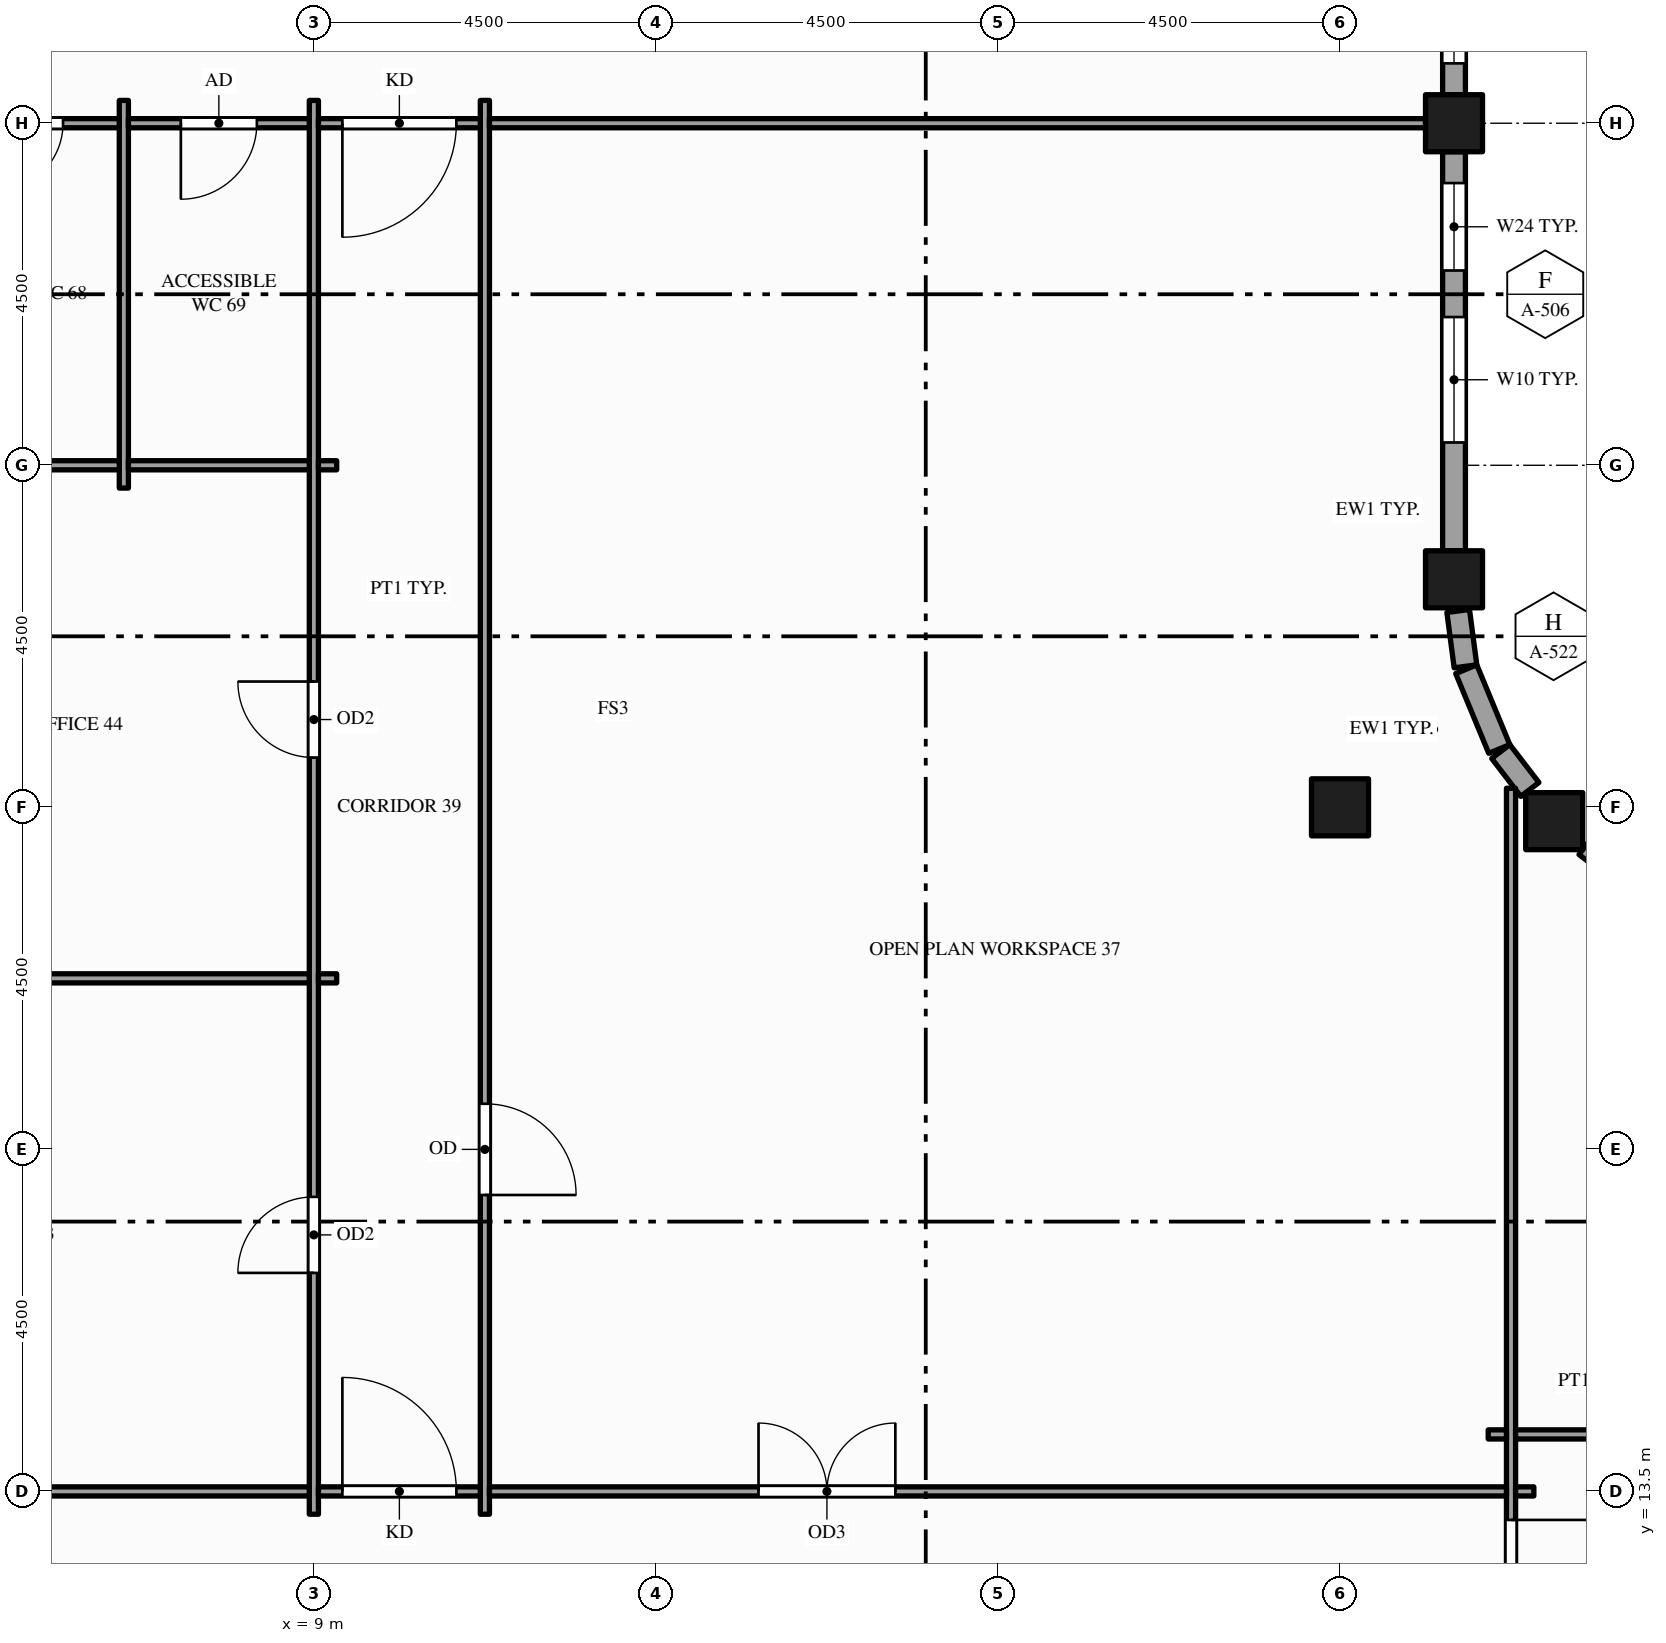
"""IFC4 building model, lengths in metres.
Left out: names, types, materials, properties, quantities, classifications, styles, units other than length and angle.
Written with IfcOpenShell. Run it as: python <this file> out.ifc"""

import sys

from ifc_helpers import new_model, si_unit, direction, frame, frame_2d, origin, origin_2d, place, context, subcontext, project, spatial, rectangle, hollow_rectangle, extrude, element, fill, save


model = new_model("IFC4")
c1 = context("Model", 3, precision=1e-05, world=origin(), true_north=direction((0.0, 1.0)))
c2 = subcontext(c1, "Body", "Model", "MODEL_VIEW")
j1 = project(units=[si_unit("LENGTHUNIT", "METRE"), si_unit("PLANEANGLEUNIT", "RADIAN")], contexts=[c1])
p1 = place(None, origin())
s1 = spatial("IfcSite", under=j1, at=p1, CompositionType="ELEMENT")
p2 = place(p1, origin())
s2 = spatial("IfcBuilding", under=s1, at=p2, CompositionType="ELEMENT")
p3 = place(p2, frame((0.0, 0.0, 235.0)))
s3 = spatial("IfcBuildingStorey", under=s2, at=p3, CompositionType="ELEMENT", Elevation=235.0)
for number, where, z_axis, x_axis in (
    (1, (22.5, 22.5, -0.15), (0.0, 0.0, 1.0), (1.0, 0.0, 0.0)),
    (2, (24.0, 25.5, -0.15), (0.0, 0.0, 1.0), (1.0, 0.0, 0.0)),
    (3, (24.0, 31.5, -0.15), (0.0, 0.0, 1.0), (1.0, 0.0, 0.0)),
    (4, (25.318, 22.318, -0.15), (0.0, 0.0, 1.0), (1.0, 0.0, 0.0)),
):
    element("IfcColumn", number, at=place(p3, frame(where, z_axis=z_axis, x_axis=x_axis)), inside=s3, PredefinedType="COLUMN", context=c2, shape_type="SweptSolid", body=[
        extrude(hollow_rectangle(XDim=0.75, YDim=0.75, WallThickness=0.036, at=origin_2d()), origin(), (0.0, 0.0, 1.0), 4.0),
    ])
p4 = place(p3, frame((26.234, 21.615, 0.0), z_axis=(0.0, 0.0, 1.0), x_axis=(-0.793575131083, 0.608472276547, 0.0)))
e5 = element("IfcWall", 5, at=p4, inside=s3, PredefinedType="STANDARD", context=c2, shape_type="SweptSolid", body=[
    extrude(rectangle(XDim=0.629, YDim=0.3, at=frame_2d((0.314, 0.0))), origin(), (0.0, 0.0, 1.0), 3.157),
])
p5 = place(p3, frame((24.998, 22.735, 0.0), z_axis=(0.0, 0.0, 1.0), x_axis=(-0.608472276547, 0.793575131083, 0.0)))
e6 = element("IfcWall", 6, at=p5, inside=s3, PredefinedType="STANDARD", context=c2, shape_type="SweptSolid", body=[
    extrude(rectangle(XDim=0.629, YDim=0.3, at=frame_2d((0.314, 0.0))), origin(), (0.0, 0.0, 1.0), 2.76),
])
p6 = place(p3, frame((24.595, 23.268, 0.0), z_axis=(0.0, 0.0, 1.0), x_axis=(-0.382598720491, 0.923914616768, 0.0)))
e7 = element("IfcWall", 7, at=p6, inside=s3, PredefinedType="STANDARD", context=c2, shape_type="SweptSolid", body=[
    extrude(rectangle(XDim=1.135, YDim=0.3, at=frame_2d((0.568, 0.0))), origin(), (0.0, 0.0, 1.0), 2.76),
])
p7 = place(p3, frame((24.151, 24.355, 0.0), z_axis=(0.0, 0.0, 1.0), x_axis=(-0.130660917588, 0.99142711513, 0.0)))
e8 = element("IfcWall", 8, at=p7, inside=s3, PredefinedType="STANDARD", context=c2, shape_type="SweptSolid", body=[
    extrude(rectangle(XDim=0.734, YDim=0.3, at=frame_2d((0.367, 0.0))), origin(), (0.0, 0.0, 1.0), 3.157),
])
p8 = place(p3, frame((24.0, 25.875, 0.0), z_axis=(0.0, 0.0, 1.0), x_axis=(0.0, 1.0, 0.0)))
e9 = element("IfcWall", 9, at=p8, inside=s3, PredefinedType="STANDARD", context=c2, shape_type="SweptSolid", body=[
    extrude(rectangle(XDim=5.25, YDim=0.3, at=frame_2d((2.625, 0.0))), origin(), (0.0, 0.0, 1.0), 3.157),
])
p9 = place(p8, frame((1.425, 0.0, 0.9)))
e10 = element("IfcOpeningElement", 10, at=p9, cuts=e9, PredefinedType="OPENING", context=c2, shape_type="SweptSolid", body=[
    extrude(rectangle(XDim=1.65, YDim=2.0, at=frame_2d((0.825, 1.0))), frame((0.0, 0.16, 0.0), z_axis=(0.0, -1.0, 0.0), x_axis=(1.0, 0.0, 0.0)), (0.0, 0.0, 1.0), 0.32),
])
p10 = place(p8, frame((3.688, 0.0, 0.9)))
e11 = element("IfcOpeningElement", 11, at=p10, cuts=e9, PredefinedType="OPENING", context=c2, shape_type="SweptSolid", body=[
    extrude(rectangle(XDim=1.15, YDim=2.0, at=frame_2d((0.575, 1.0))), frame((0.0, 0.16, 0.0), z_axis=(0.0, -1.0, 0.0), x_axis=(1.0, 0.0, 0.0)), (0.0, 0.0, 1.0), 0.32),
])
p11 = place(p3, frame((24.0, 31.875, 0.0), z_axis=(0.0, 0.0, 1.0), x_axis=(0.0, 1.0, 0.0)))
e12 = element("IfcWall", 12, at=p11, inside=s3, PredefinedType="STANDARD", context=c2, shape_type="SweptSolid", body=[
    extrude(rectangle(XDim=3.75, YDim=0.3, at=frame_2d((1.875, 0.0))), origin(), (0.0, 0.0, 1.0), 3.157),
])
p12 = place(p11, frame((0.413, 0.0, 0.9)))
e13 = element("IfcOpeningElement", 13, at=p12, cuts=e12, PredefinedType="OPENING", context=c2, shape_type="SweptSolid", body=[
    extrude(rectangle(XDim=1.15, YDim=2.0, at=frame_2d((0.575, 1.0))), frame((0.0, 0.16, 0.0), z_axis=(0.0, -1.0, 0.0), x_axis=(1.0, 0.0, 0.0)), (0.0, 0.0, 1.0), 0.32),
])
p13 = place(p11, frame((2.188, 0.0, 0.9)))
e14 = element("IfcOpeningElement", 14, at=p13, cuts=e12, PredefinedType="OPENING", context=c2, shape_type="SweptSolid", body=[
    extrude(rectangle(XDim=1.15, YDim=2.0, at=frame_2d((0.575, 1.0))), frame((0.0, 0.16, 0.0), z_axis=(0.0, -1.0, 0.0), x_axis=(1.0, 0.0, 0.0)), (0.0, 0.0, 1.0), 0.32),
])
p14 = place(p3, frame((6.5, 26.7, 0.0), z_axis=(0.0, 0.0, 1.0), x_axis=(0.0, 1.0, 0.0)))
e15 = element("IfcWall", 15, at=p14, inside=s3, PredefinedType="PARTITIONING", context=c2, shape_type="SweptSolid", body=[
    extrude(rectangle(XDim=5.1, YDim=0.12, at=frame_2d((2.55, 0.0))), origin(), (0.0, 0.0, 1.0), 3.85),
])
p15 = place(p3, frame((9.0, 13.2, 0.0), z_axis=(0.0, 0.0, 1.0), x_axis=(0.0, 1.0, 0.0)))
e16 = element("IfcWall", 16, at=p15, inside=s3, PredefinedType="PARTITIONING", context=c2, shape_type="SweptSolid", body=[
    extrude(rectangle(XDim=18.6, YDim=0.12, at=frame_2d((9.3, 0.0))), origin(), (0.0, 0.0, 1.0), 2.6),
])
p16 = place(p15, frame((3.175, 0.0, 0.0)))
e17 = element("IfcOpeningElement", 17, at=p16, cuts=e16, PredefinedType="OPENING", context=c2, shape_type="SweptSolid", body=[
    extrude(rectangle(XDim=1.0, YDim=2.1, at=frame_2d((0.5, 1.05))), frame((0.0, 0.07, 0.0), z_axis=(0.0, -1.0, 0.0), x_axis=(1.0, 0.0, 0.0)), (0.0, 0.0, 1.0), 0.14),
])
p17 = place(p15, frame((9.955, 0.0, 0.0)))
e18 = element("IfcOpeningElement", 18, at=p17, cuts=e16, PredefinedType="OPENING", context=c2, shape_type="SweptSolid", body=[
    extrude(rectangle(XDim=1.0, YDim=2.1, at=frame_2d((0.5, 1.05))), frame((0.0, 0.07, 0.0), z_axis=(0.0, -1.0, 0.0), x_axis=(1.0, 0.0, 0.0)), (0.0, 0.0, 1.0), 0.14),
])
p18 = place(p3, frame((11.25, 13.2, 0.0), z_axis=(0.0, 0.0, 1.0), x_axis=(0.0, 1.0, 0.0)))
e19 = element("IfcWall", 19, at=p18, inside=s3, PredefinedType="PARTITIONING", context=c2, shape_type="SweptSolid", body=[
    extrude(rectangle(XDim=18.6, YDim=0.12, at=frame_2d((9.3, 0.0))), origin(), (0.0, 0.0, 1.0), 2.6),
])
p19 = place(p18, frame((4.2, 0.0, 0.0)))
e20 = element("IfcOpeningElement", 20, at=p19, cuts=e19, PredefinedType="OPENING", context=c2, shape_type="SweptSolid", body=[
    extrude(rectangle(XDim=1.2, YDim=2.1, at=frame_2d((0.6, 1.05))), frame((0.0, 0.07, 0.0), z_axis=(0.0, -1.0, 0.0), x_axis=(1.0, 0.0, 0.0)), (0.0, 0.0, 1.0), 0.14),
])
p20 = place(p3, frame((24.75, -1.35, 0.0), z_axis=(0.0, 0.0, 1.0), x_axis=(0.0, 1.0, 0.0)))
e21 = element("IfcWall", 21, at=p20, inside=s3, PredefinedType="PARTITIONING", context=c2, shape_type="SweptSolid", body=[
    extrude(rectangle(XDim=24.101, YDim=0.12, at=frame_2d((12.05, 0.0))), origin(), (0.0, 0.0, 1.0), 2.76),
])
p21 = place(p20, frame((12.975, 0.0, 0.0)))
e22 = element("IfcOpeningElement", 22, at=p21, cuts=e21, PredefinedType="OPENING", context=c2, shape_type="SweptSolid", body=[
    extrude(rectangle(XDim=1.5, YDim=2.1, at=frame_2d((0.75, 1.05))), frame((0.0, 0.07, 0.0), z_axis=(0.0, -1.0, 0.0), x_axis=(1.0, 0.0, 0.0)), (0.0, 0.0, 1.0), 0.14),
])
p22 = place(p3, frame((0.15, 13.5, 0.0), z_axis=(0.0, 0.0, 1.0), x_axis=(1.0, 0.0, 0.0)))
e23 = element("IfcWall", 23, at=p22, inside=s3, PredefinedType="PARTITIONING", context=c2, shape_type="SweptSolid", body=[
    extrude(rectangle(XDim=8.79, YDim=0.12, at=frame_2d((4.395, 0.0))), origin(), (0.0, 0.0, 1.0), 2.87),
])
p23 = place(p3, frame((9.06, 13.5, 0.0), z_axis=(0.0, 0.0, 1.0), x_axis=(1.0, 0.0, 0.0)))
e24 = element("IfcWall", 24, at=p23, inside=s3, PredefinedType="PARTITIONING", context=c2, shape_type="SweptSolid", body=[
    extrude(rectangle(XDim=2.13, YDim=0.12, at=frame_2d((1.065, 0.0))), origin(), (0.0, 0.0, 1.0), 2.87),
])
p24 = place(p23, frame((0.315, 0.0, 0.0)))
e25 = element("IfcOpeningElement", 25, at=p24, cuts=e24, PredefinedType="OPENING", context=c2, shape_type="SweptSolid", body=[
    extrude(rectangle(XDim=1.5, YDim=2.1, at=frame_2d((0.75, 1.05))), frame((0.0, 0.07, 0.0), z_axis=(0.0, -1.0, 0.0), x_axis=(1.0, 0.0, 0.0)), (0.0, 0.0, 1.0), 0.14),
])
p25 = place(p3, frame((11.31, 13.5, 0.0), z_axis=(0.0, 0.0, 1.0), x_axis=(1.0, 0.0, 0.0)))
e26 = element("IfcWall", 26, at=p25, inside=s3, PredefinedType="PARTITIONING", context=c2, shape_type="SweptSolid", body=[
    extrude(rectangle(XDim=13.38, YDim=0.12, at=frame_2d((6.69, 0.0))), origin(), (0.0, 0.0, 1.0), 2.76),
])
p26 = place(p25, frame((3.54, 0.0, 0.0)))
e27 = element("IfcOpeningElement", 27, at=p26, cuts=e26, PredefinedType="OPENING", context=c2, shape_type="SweptSolid", body=[
    extrude(rectangle(XDim=1.8, YDim=2.1, at=frame_2d((0.9, 1.05))), frame((0.0, 0.07, 0.0), z_axis=(0.0, -1.0, 0.0), x_axis=(1.0, 0.0, 0.0)), (0.0, 0.0, 1.0), 0.14),
])
for number, where, z_axis, x_axis in (
    (28, (24.81, 13.5, 0.0), (0.0, 0.0, 1.0), (1.0, 0.0, 0.0)),
    (29, (24.45, 14.25, 0.0), (0.0, 0.0, 1.0), (1.0, 0.0, 0.0)),
):
    element("IfcWall", number, at=place(p3, frame(where, z_axis=z_axis, x_axis=x_axis)), inside=s3, PredefinedType="PARTITIONING", context=c2, shape_type="SweptSolid", body=[
        extrude(rectangle(XDim=0.24, YDim=0.12, at=frame_2d((0.12, 0.0))), origin(), (0.0, 0.0, 1.0), 2.76),
    ])
p27 = place(p3, frame((24.81, 14.25, 0.0), z_axis=(0.0, 0.0, 1.0), x_axis=(1.0, 0.0, 0.0)))
e30 = element("IfcWall", 30, at=p27, inside=s3, PredefinedType="PARTITIONING", context=c2, shape_type="SweptSolid", body=[
    extrude(rectangle(XDim=2.13, YDim=0.12, at=frame_2d((1.065, 0.0))), origin(), (0.0, 0.0, 1.0), 2.76),
])
p28 = place(p3, frame((0.15, 20.25, 0.0), z_axis=(0.0, 0.0, 1.0), x_axis=(1.0, 0.0, 0.0)))
e31 = element("IfcWall", 31, at=p28, inside=s3, PredefinedType="PARTITIONING", context=c2, shape_type="SweptSolid", body=[
    extrude(rectangle(XDim=8.79, YDim=0.12, at=frame_2d((4.395, 0.0))), origin(), (0.0, 0.0, 1.0), 2.87),
])
p29 = place(p3, frame((9.06, 20.25, 0.0), z_axis=(0.0, 0.0, 1.0), x_axis=(1.0, 0.0, 0.0)))
e32 = element("IfcWall", 32, at=p29, inside=s3, PredefinedType="PARTITIONING", context=c2, shape_type="SweptSolid", body=[
    extrude(rectangle(XDim=0.24, YDim=0.12, at=frame_2d((0.12, 0.0))), origin(), (0.0, 0.0, 1.0), 2.87),
])
for number, where, z_axis, x_axis in (
    (33, (4.06, 27.0, 0.0), (0.0, 0.0, 1.0), (1.0, 0.0, 0.0)),
    (34, (6.56, 27.0, 0.0), (0.0, 0.0, 1.0), (1.0, 0.0, 0.0)),
):
    element("IfcWall", number, at=place(p3, frame(where, z_axis=z_axis, x_axis=x_axis)), inside=s3, PredefinedType="PARTITIONING", context=c2, shape_type="SweptSolid", body=[
        extrude(rectangle(XDim=2.38, YDim=0.12, at=frame_2d((1.19, 0.0))), origin(), (0.0, 0.0, 1.0), 2.87),
    ])
p30 = place(p3, frame((9.06, 27.0, 0.0), z_axis=(0.0, 0.0, 1.0), x_axis=(1.0, 0.0, 0.0)))
e35 = element("IfcWall", 35, at=p30, inside=s3, PredefinedType="PARTITIONING", context=c2, shape_type="SweptSolid", body=[
    extrude(rectangle(XDim=0.24, YDim=0.12, at=frame_2d((0.12, 0.0))), origin(), (0.0, 0.0, 1.0), 2.87),
])
p31 = place(p3, frame((4.06, 31.5, 0.0), z_axis=(0.0, 0.0, 1.0), x_axis=(1.0, 0.0, 0.0)))
e36 = element("IfcWall", 36, at=p31, inside=s3, PredefinedType="PARTITIONING", context=c2, shape_type="SweptSolid", body=[
    extrude(rectangle(XDim=2.38, YDim=0.12, at=frame_2d((1.19, 0.0))), origin(), (0.0, 0.0, 1.0), 2.87),
])
p32 = place(p31, frame((0.74, 0.0, 0.0)))
e37 = element("IfcOpeningElement", 37, at=p32, cuts=e36, PredefinedType="OPENING", context=c2, shape_type="SweptSolid", body=[
    extrude(rectangle(XDim=0.9, YDim=2.1, at=frame_2d((0.45, 1.05))), frame((0.0, 0.07, 0.0), z_axis=(0.0, -1.0, 0.0), x_axis=(1.0, 0.0, 0.0)), (0.0, 0.0, 1.0), 0.14),
])
p33 = place(p3, frame((6.56, 31.5, 0.0), z_axis=(0.0, 0.0, 1.0), x_axis=(1.0, 0.0, 0.0)))
e38 = element("IfcWall", 38, at=p33, inside=s3, PredefinedType="PARTITIONING", context=c2, shape_type="SweptSolid", body=[
    extrude(rectangle(XDim=2.38, YDim=0.12, at=frame_2d((1.19, 0.0))), origin(), (0.0, 0.0, 1.0), 2.87),
])
p34 = place(p33, frame((0.69, 0.0, 0.0)))
e39 = element("IfcOpeningElement", 39, at=p34, cuts=e38, PredefinedType="OPENING", context=c2, shape_type="SweptSolid", body=[
    extrude(rectangle(XDim=1.0, YDim=2.1, at=frame_2d((0.5, 1.05))), frame((0.0, 0.07, 0.0), z_axis=(0.0, -1.0, 0.0), x_axis=(1.0, 0.0, 0.0)), (0.0, 0.0, 1.0), 0.14),
])
p35 = place(p3, frame((9.06, 31.5, 0.0), z_axis=(0.0, 0.0, 1.0), x_axis=(1.0, 0.0, 0.0)))
e40 = element("IfcWall", 40, at=p35, inside=s3, PredefinedType="PARTITIONING", context=c2, shape_type="SweptSolid", body=[
    extrude(rectangle(XDim=2.13, YDim=0.12, at=frame_2d((1.065, 0.0))), origin(), (0.0, 0.0, 1.0), 2.87),
])
p36 = place(p35, frame((0.315, 0.0, 0.0)))
e41 = element("IfcOpeningElement", 41, at=p36, cuts=e40, PredefinedType="OPENING", context=c2, shape_type="SweptSolid", body=[
    extrude(rectangle(XDim=1.5, YDim=2.1, at=frame_2d((0.75, 1.05))), frame((0.0, 0.07, 0.0), z_axis=(0.0, -1.0, 0.0), x_axis=(1.0, 0.0, 0.0)), (0.0, 0.0, 1.0), 0.14),
])
p37 = place(p3, frame((11.31, 31.5, 0.0), z_axis=(0.0, 0.0, 1.0), x_axis=(1.0, 0.0, 0.0)))
e42 = element("IfcWall", 42, at=p37, inside=s3, PredefinedType="PARTITIONING", context=c2, shape_type="SweptSolid", body=[
    extrude(rectangle(XDim=12.54, YDim=0.12, at=frame_2d((6.27, 0.0))), origin(), (0.0, 0.0, 1.0), 2.87),
])
p38 = place(p9, origin())
e43 = element("IfcWindow", 43, at=p38, inside=s3, PartitioningType="SINGLE_PANEL", PredefinedType="WINDOW", context=c2, shape_type="SweptSolid", body=[
    extrude(rectangle(XDim=1.65, YDim=2.0, at=frame_2d((0.825, 1.0))), frame((0.0, 0.03, 0.0), z_axis=(0.0, -1.0, 0.0), x_axis=(1.0, 0.0, 0.0)), (0.0, 0.0, 1.0), 0.06),
])
fill(e10, e43)
p39 = place(p10, origin())
e44 = element("IfcWindow", 44, at=p39, inside=s3, PartitioningType="SINGLE_PANEL", PredefinedType="WINDOW", context=c2, shape_type="SweptSolid", body=[
    extrude(rectangle(XDim=1.15, YDim=2.0, at=frame_2d((0.575, 1.0))), frame((0.0, 0.03, 0.0), z_axis=(0.0, -1.0, 0.0), x_axis=(1.0, 0.0, 0.0)), (0.0, 0.0, 1.0), 0.06),
])
fill(e11, e44)
p40 = place(p12, origin())
e45 = element("IfcWindow", 45, at=p40, inside=s3, PartitioningType="SINGLE_PANEL", PredefinedType="WINDOW", context=c2, shape_type="SweptSolid", body=[
    extrude(rectangle(XDim=1.15, YDim=2.0, at=frame_2d((0.575, 1.0))), frame((0.0, 0.03, 0.0), z_axis=(0.0, -1.0, 0.0), x_axis=(1.0, 0.0, 0.0)), (0.0, 0.0, 1.0), 0.06),
])
fill(e13, e45)
p41 = place(p21, origin())
e46 = element("IfcDoor", 46, at=p41, inside=s3, OperationType="SINGLE_SWING_RIGHT", PredefinedType="DOOR", context=c2, shape_type="SweptSolid", body=[
    extrude(rectangle(XDim=1.5, YDim=2.1, at=frame_2d((0.75, 1.05))), frame((0.0, 0.025, 0.0), z_axis=(0.0, -1.0, 0.0), x_axis=(1.0, 0.0, 0.0)), (0.0, 0.0, 1.0), 0.05),
])
fill(e22, e46)
p42 = place(p26, origin())
e47 = element("IfcDoor", 47, at=p42, inside=s3, OperationType="DOUBLE_DOOR_SINGLE_SWING", PredefinedType="DOOR", context=c2, shape_type="SweptSolid", body=[
    extrude(rectangle(XDim=1.8, YDim=2.1, at=frame_2d((0.9, 1.05))), frame((0.0, 0.025, 0.0), z_axis=(0.0, -1.0, 0.0), x_axis=(1.0, 0.0, 0.0)), (0.0, 0.0, 1.0), 0.05),
])
fill(e27, e47)
p43 = place(p24, origin())
e48 = element("IfcDoor", 48, at=p43, inside=s3, OperationType="SINGLE_SWING_LEFT", PredefinedType="DOOR", context=c2, shape_type="SweptSolid", body=[
    extrude(rectangle(XDim=1.5, YDim=2.1, at=frame_2d((0.75, 1.05))), frame((0.0, 0.025, 0.0), z_axis=(0.0, -1.0, 0.0), x_axis=(1.0, 0.0, 0.0)), (0.0, 0.0, 1.0), 0.05),
])
fill(e25, e48)
p44 = place(p36, origin())
e49 = element("IfcDoor", 49, at=p44, inside=s3, OperationType="SINGLE_SWING_LEFT", PredefinedType="DOOR", context=c2, shape_type="SweptSolid", body=[
    extrude(rectangle(XDim=1.5, YDim=2.1, at=frame_2d((0.75, 1.05))), frame((0.0, 0.025, 0.0), z_axis=(0.0, -1.0, 0.0), x_axis=(1.0, 0.0, 0.0)), (0.0, 0.0, 1.0), 0.05),
])
fill(e41, e49)
p45 = place(p16, origin())
e50 = element("IfcDoor", 50, at=p45, inside=s3, OperationType="SINGLE_SWING_LEFT", PredefinedType="DOOR", context=c2, shape_type="SweptSolid", body=[
    extrude(rectangle(XDim=1.0, YDim=2.1, at=frame_2d((0.5, 1.05))), frame((0.0, 0.025, 0.0), z_axis=(0.0, -1.0, 0.0), x_axis=(1.0, 0.0, 0.0)), (0.0, 0.0, 1.0), 0.05),
])
fill(e17, e50)
p46 = place(p17, origin())
e51 = element("IfcDoor", 51, at=p46, inside=s3, OperationType="SINGLE_SWING_RIGHT", PredefinedType="DOOR", context=c2, shape_type="SweptSolid", body=[
    extrude(rectangle(XDim=1.0, YDim=2.1, at=frame_2d((0.5, 1.05))), frame((0.0, 0.025, 0.0), z_axis=(0.0, -1.0, 0.0), x_axis=(1.0, 0.0, 0.0)), (0.0, 0.0, 1.0), 0.05),
])
fill(e18, e51)
p47 = place(p32, origin())
e52 = element("IfcDoor", 52, at=p47, inside=s3, OperationType="SINGLE_SWING_LEFT", PredefinedType="DOOR", context=c2, shape_type="SweptSolid", body=[
    extrude(rectangle(XDim=0.9, YDim=2.1, at=frame_2d((0.45, 1.05))), frame((0.0, 0.025, 0.0), z_axis=(0.0, -1.0, 0.0), x_axis=(1.0, 0.0, 0.0)), (0.0, 0.0, 1.0), 0.05),
])
fill(e37, e52)
p48 = place(p34, origin())
e53 = element("IfcDoor", 53, at=p48, inside=s3, OperationType="SINGLE_SWING_LEFT", PredefinedType="DOOR", context=c2, shape_type="SweptSolid", body=[
    extrude(rectangle(XDim=1.0, YDim=2.1, at=frame_2d((0.5, 1.05))), frame((0.0, 0.025, 0.0), z_axis=(0.0, -1.0, 0.0), x_axis=(1.0, 0.0, 0.0)), (0.0, 0.0, 1.0), 0.05),
])
fill(e39, e53)
p49 = place(p19, origin())
e54 = element("IfcDoor", 54, at=p49, inside=s3, OperationType="SINGLE_SWING_LEFT", PredefinedType="DOOR", context=c2, shape_type="SweptSolid", body=[
    extrude(rectangle(XDim=1.2, YDim=2.1, at=frame_2d((0.6, 1.05))), frame((0.0, 0.025, 0.0), z_axis=(0.0, -1.0, 0.0), x_axis=(1.0, 0.0, 0.0)), (0.0, 0.0, 1.0), 0.05),
])
fill(e20, e54)
save(model, sys.argv[1])
